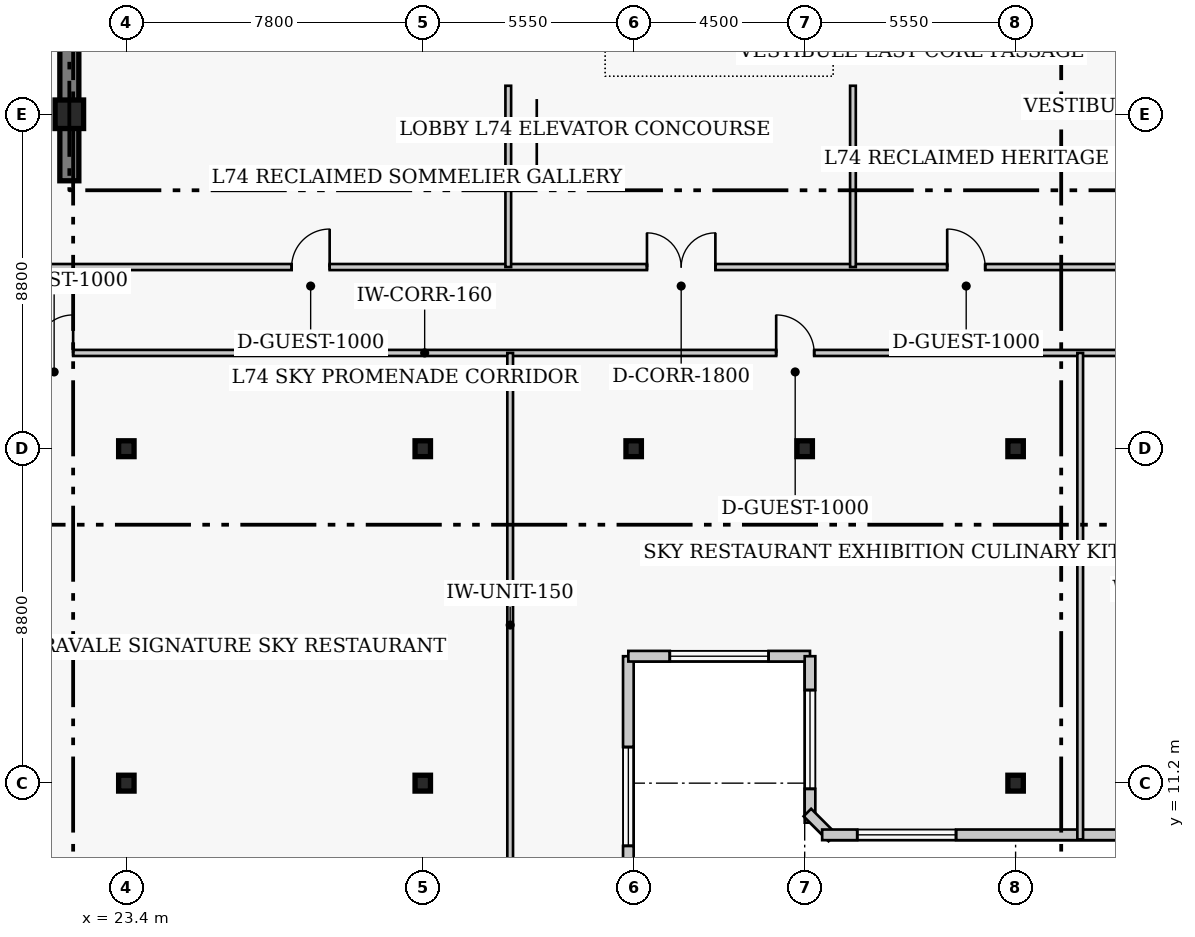
"""IFC4 building model, lengths in metres.
Left out: names, types, materials, properties, quantities, classifications, styles, units other than length and angle.
Written with IfcOpenShell. Run it as: python <this file> out.ifc"""

import sys

from ifc_helpers import new_model, si_unit, direction, frame, frame_2d, origin, origin_2d, place, context, subcontext, project, spatial, rectangle, i_section, extrude, element, fill, save


model = new_model("IFC4")
c1 = context("Model", 3, precision=1e-05, world=origin(), true_north=direction((0.0, 1.0)))
c2 = subcontext(c1, "Body", "Model", "MODEL_VIEW")
j1 = project(units=[si_unit("LENGTHUNIT", "METRE"), si_unit("PLANEANGLEUNIT", "RADIAN")], contexts=[c1])
p1 = place(None, origin())
s1 = spatial("IfcSite", under=j1, at=p1, CompositionType="ELEMENT")
p2 = place(p1, origin())
s2 = spatial("IfcBuilding", under=s1, at=p2, CompositionType="ELEMENT")
p3 = place(p2, frame((0.0, 0.0, 297.4)))
s3 = spatial("IfcBuildingStorey", under=s2, at=p3, CompositionType="ELEMENT", Elevation=297.4)
p4 = place(p3, frame((21.9, 27.05, 0.0), z_axis=(0.0, 0.0, 1.0), x_axis=(0.0, 1.0, 0.0)))
e1 = element("IfcWall", 1, at=p4, inside=s3, PredefinedType="SHEAR", context=c2, shape_type="SweptSolid", body=[
    extrude(rectangle(XDim=13.52, YDim=0.5, at=frame_2d((6.76, 0.0))), origin(), (0.0, 0.0, 1.0), 4.6),
])
for number, where, z_axis, x_axis in (
    (2, (23.4, 11.2, 0.0), (0.0, 0.0, 1.0), (1.0, 0.0, 0.0)),
    (3, (23.4, 20.0, 0.0), (0.0, 0.0, 1.0), (1.0, 0.0, 0.0)),
    (4, (31.2, 11.2, 0.0), (0.0, 0.0, 1.0), (1.0, 0.0, 0.0)),
    (5, (31.2, 20.0, 0.0), (0.0, 0.0, 1.0), (1.0, 0.0, 0.0)),
    (6, (36.75, 20.0, 0.0), (0.0, 0.0, 1.0), (1.0, 0.0, 0.0)),
    (7, (41.25, 20.0, 0.0), (0.0, 0.0, 1.0), (1.0, 0.0, 0.0)),
    (8, (46.8, 11.2, 0.0), (0.0, 0.0, 1.0), (1.0, 0.0, 0.0)),
    (9, (46.8, 20.0, 0.0), (0.0, 0.0, 1.0), (1.0, 0.0, 0.0)),
):
    element("IfcColumn", number, at=place(p3, frame(where, z_axis=z_axis, x_axis=x_axis)), inside=s3, PredefinedType="COLUMN", context=c2, shape_type="SweptSolid", body=[
        extrude(i_section(OverallWidth=0.406, OverallDepth=0.417, WebThickness=0.03, FlangeThickness=0.048, FilletRadius=0.017, at=origin_2d()), origin(), (0.0, 0.0, 1.0), 4.6),
    ])
p5 = place(p3, frame((21.9, 28.8, 0.0), z_axis=(0.0, 0.0, 1.0), x_axis=(1.0, 0.0, 0.0)))
e10 = element("IfcColumn", 10, at=p5, inside=s3, PredefinedType="COLUMN", context=c2, shape_type="SweptSolid", body=[
    extrude(rectangle(XDim=0.75, YDim=0.75, at=origin_2d()), origin(), (0.0, 0.0, 1.0), 4.6),
])
p6 = place(p3, frame((36.61, 7.16, 0.0), z_axis=(0.0, 0.0, 1.0), x_axis=(0.0, 1.0, 0.0)))
e11 = element("IfcWall", 11, at=p6, inside=s3, PredefinedType="SOLIDWALL", context=c2, shape_type="SweptSolid", body=[
    extrude(rectangle(XDim=7.38, YDim=0.28, at=frame_2d((3.69, 0.0))), origin(), (0.0, 0.0, 1.0), 4.31),
])
p7 = place(p6, frame((2.39, 0.0, 0.65)))
e12 = element("IfcOpeningElement", 12, at=p7, cuts=e11, PredefinedType="OPENING", context=c2, shape_type="SweptSolid", body=[
    extrude(rectangle(XDim=2.6, YDim=2.2, at=frame_2d((1.3, 1.1))), frame((0.0, 0.15, 0.0), z_axis=(0.0, -1.0, 0.0), x_axis=(1.0, 0.0, 0.0)), (0.0, 0.0, 1.0), 0.3),
])
p8 = place(p3, frame((36.61, 14.54, 0.0), z_axis=(0.0, 0.0, 1.0), x_axis=(1.0, 0.0, 0.0)))
e13 = element("IfcWall", 13, at=p8, inside=s3, PredefinedType="SOLIDWALL", context=c2, shape_type="SweptSolid", body=[
    extrude(rectangle(XDim=4.78, YDim=0.28, at=frame_2d((2.39, 0.0))), origin(), (0.0, 0.0, 1.0), 4.31),
])
p9 = place(p8, frame((1.09, 0.0, 0.65)))
e14 = element("IfcOpeningElement", 14, at=p9, cuts=e13, PredefinedType="OPENING", context=c2, shape_type="SweptSolid", body=[
    extrude(rectangle(XDim=2.6, YDim=2.2, at=frame_2d((1.3, 1.1))), frame((0.0, 0.15, 0.0), z_axis=(0.0, -1.0, 0.0), x_axis=(1.0, 0.0, 0.0)), (0.0, 0.0, 1.0), 0.3),
])
p10 = place(p3, frame((41.39, 14.54, 0.0), z_axis=(0.0, 0.0, 1.0), x_axis=(0.0, -1.0, 0.0)))
e15 = element("IfcWall", 15, at=p10, inside=s3, PredefinedType="SOLIDWALL", context=c2, shape_type="SweptSolid", body=[
    extrude(rectangle(XDim=4.38, YDim=0.28, at=frame_2d((2.19, 0.0))), origin(), (0.0, 0.0, 1.0), 4.31),
])
p11 = place(p10, frame((0.89, 0.0, 0.65)))
e16 = element("IfcOpeningElement", 16, at=p11, cuts=e15, PredefinedType="OPENING", context=c2, shape_type="SweptSolid", body=[
    extrude(rectangle(XDim=2.6, YDim=2.2, at=frame_2d((1.3, 1.1))), frame((0.0, 0.15, 0.0), z_axis=(0.0, -1.0, 0.0), x_axis=(1.0, 0.0, 0.0)), (0.0, 0.0, 1.0), 0.3),
])
p12 = place(p3, frame((41.321, 10.427, 0.0), z_axis=(0.0, 0.0, 1.0), x_axis=(0.707106781187, -0.707106781187, 0.0)))
e17 = element("IfcWall", 17, at=p12, inside=s3, PredefinedType="SOLIDWALL", context=c2, shape_type="SweptSolid", body=[
    extrude(rectangle(XDim=0.928, YDim=0.28, at=frame_2d((0.464, 0.0))), origin(), (0.0, 0.0, 1.0), 4.31),
])
p13 = place(p3, frame((41.71, 9.84, 0.0), z_axis=(0.0, 0.0, 1.0), x_axis=(1.0, 0.0, 0.0)))
e18 = element("IfcWall", 18, at=p13, inside=s3, PredefinedType="SOLIDWALL", context=c2, shape_type="SweptSolid", body=[
    extrude(rectangle(XDim=22.23, YDim=0.28, at=frame_2d((11.115, 0.0))), origin(), (0.0, 0.0, 1.0), 4.31),
])
p14 = place(p13, frame((0.923, 0.0, 0.65)))
e19 = element("IfcOpeningElement", 19, at=p14, cuts=e18, PredefinedType="OPENING", context=c2, shape_type="SweptSolid", body=[
    extrude(rectangle(XDim=2.6, YDim=2.2, at=frame_2d((1.3, 1.1))), frame((0.0, 0.15, 0.0), z_axis=(0.0, -1.0, 0.0), x_axis=(1.0, 0.0, 0.0)), (0.0, 0.0, 1.0), 0.3),
])
p15 = place(p13, frame((9.165, 0.0, 0.65)))
e20 = element("IfcOpeningElement", 20, at=p15, cuts=e18, PredefinedType="OPENING", context=c2, shape_type="SweptSolid", body=[
    extrude(rectangle(XDim=2.6, YDim=2.2, at=frame_2d((1.3, 1.1))), frame((0.0, 0.15, 0.0), z_axis=(0.0, -1.0, 0.0), x_axis=(1.0, 0.0, 0.0)), (0.0, 0.0, 1.0), 0.3),
])
p16 = place(p13, frame((14.261, 0.0, 0.65)))
e21 = element("IfcOpeningElement", 21, at=p16, cuts=e18, PredefinedType="OPENING", context=c2, shape_type="SweptSolid", body=[
    extrude(rectangle(XDim=2.6, YDim=2.2, at=frame_2d((1.3, 1.1))), frame((0.0, 0.15, 0.0), z_axis=(0.0, -1.0, 0.0), x_axis=(1.0, 0.0, 0.0)), (0.0, 0.0, 1.0), 0.3),
])
p17 = place(p3, frame((9.3, 22.52, 0.0), z_axis=(0.0, 0.0, 1.0), x_axis=(1.0, 0.0, 0.0)))
e22 = element("IfcWall", 22, at=p17, inside=s3, PredefinedType="PARTITIONING", context=c2, shape_type="SweptSolid", body=[
    extrude(rectangle(XDim=59.4, YDim=0.16, at=frame_2d((29.7, 0.0))), origin(), (0.0, 0.0, 1.0), 4.31),
])
p18 = place(p17, frame((11.7, 0.0, 0.0)))
e23 = element("IfcOpeningElement", 23, at=p18, cuts=e22, PredefinedType="OPENING", context=c2, shape_type="SweptSolid", body=[
    extrude(rectangle(XDim=1.0, YDim=2.15, at=frame_2d((0.5, 1.075))), frame((0.0, 0.09, 0.0), z_axis=(0.0, -1.0, 0.0), x_axis=(1.0, 0.0, 0.0)), (0.0, 0.0, 1.0), 0.18),
])
p19 = place(p17, frame((31.2, 0.0, 0.0)))
e24 = element("IfcOpeningElement", 24, at=p19, cuts=e22, PredefinedType="OPENING", context=c2, shape_type="SweptSolid", body=[
    extrude(rectangle(XDim=1.0, YDim=2.15, at=frame_2d((0.5, 1.075))), frame((0.0, 0.09, 0.0), z_axis=(0.0, -1.0, 0.0), x_axis=(1.0, 0.0, 0.0)), (0.0, 0.0, 1.0), 0.18),
])
p20 = place(p17, frame((48.7, 0.0, 0.0)))
e25 = element("IfcOpeningElement", 25, at=p20, cuts=e22, PredefinedType="OPENING", context=c2, shape_type="SweptSolid", body=[
    extrude(rectangle(XDim=1.0, YDim=2.15, at=frame_2d((0.5, 1.075))), frame((0.0, 0.09, 0.0), z_axis=(0.0, -1.0, 0.0), x_axis=(1.0, 0.0, 0.0)), (0.0, 0.0, 1.0), 0.18),
])
p21 = place(p3, frame((9.3, 24.78, 0.0), z_axis=(0.0, 0.0, 1.0), x_axis=(1.0, 0.0, 0.0)))
e26 = element("IfcWall", 26, at=p21, inside=s3, PredefinedType="PARTITIONING", context=c2, shape_type="SweptSolid", body=[
    extrude(rectangle(XDim=59.4, YDim=0.16, at=frame_2d((29.7, 0.0))), origin(), (0.0, 0.0, 1.0), 4.31),
])
p22 = place(p21, frame((27.8, 0.0, 0.0)))
e27 = element("IfcOpeningElement", 27, at=p22, cuts=e26, PredefinedType="OPENING", context=c2, shape_type="SweptSolid", body=[
    extrude(rectangle(XDim=1.8, YDim=2.2, at=frame_2d((0.9, 1.1))), frame((0.0, 0.09, 0.0), z_axis=(0.0, -1.0, 0.0), x_axis=(1.0, 0.0, 0.0)), (0.0, 0.0, 1.0), 0.18),
])
p23 = place(p21, frame((18.45, 0.0, 0.0)))
e28 = element("IfcOpeningElement", 28, at=p23, cuts=e26, PredefinedType="OPENING", context=c2, shape_type="SweptSolid", body=[
    extrude(rectangle(XDim=1.0, YDim=2.15, at=frame_2d((0.5, 1.075))), frame((0.0, 0.09, 0.0), z_axis=(0.0, -1.0, 0.0), x_axis=(1.0, 0.0, 0.0)), (0.0, 0.0, 1.0), 0.18),
])
p24 = place(p21, frame((35.7, 0.0, 0.0)))
e29 = element("IfcOpeningElement", 29, at=p24, cuts=e26, PredefinedType="OPENING", context=c2, shape_type="SweptSolid", body=[
    extrude(rectangle(XDim=1.0, YDim=2.15, at=frame_2d((0.5, 1.075))), frame((0.0, 0.09, 0.0), z_axis=(0.0, -1.0, 0.0), x_axis=(1.0, 0.0, 0.0)), (0.0, 0.0, 1.0), 0.18),
])
p25 = place(p21, frame((5.75, 0.0, 0.0)))
e30 = element("IfcOpeningElement", 30, at=p25, cuts=e26, PredefinedType="OPENING", context=c2, shape_type="SweptSolid", body=[
    extrude(rectangle(XDim=1.0, YDim=2.15, at=frame_2d((0.5, 1.075))), frame((0.0, 0.09, 0.0), z_axis=(0.0, -1.0, 0.0), x_axis=(1.0, 0.0, 0.0)), (0.0, 0.0, 1.0), 0.18),
])
p26 = place(p21, frame((49.31, 0.0, 0.0)))
e31 = element("IfcOpeningElement", 31, at=p26, cuts=e26, PredefinedType="OPENING", context=c2, shape_type="SweptSolid", body=[
    extrude(rectangle(XDim=0.88, YDim=2.05, at=frame_2d((0.44, 1.025))), frame((0.0, 0.09, 0.0), z_axis=(0.0, -1.0, 0.0), x_axis=(1.0, 0.0, 0.0)), (0.0, 0.0, 1.0), 0.18),
])
p27 = place(p21, frame((51.55, 0.0, 0.0)))
e32 = element("IfcOpeningElement", 32, at=p27, cuts=e26, PredefinedType="OPENING", context=c2, shape_type="SweptSolid", body=[
    extrude(rectangle(XDim=1.0, YDim=2.15, at=frame_2d((0.5, 1.075))), frame((0.0, 0.09, 0.0), z_axis=(0.0, -1.0, 0.0), x_axis=(1.0, 0.0, 0.0)), (0.0, 0.0, 1.0), 0.18),
])
for number, where, z_axis, x_axis in (
    (33, (33.45, 24.78, 0.0), (0.0, 0.0, 1.0), (0.0, 1.0, 0.0)),
    (34, (42.52, 24.78, 0.0), (0.0, 0.0, 1.0), (0.0, 1.0, 0.0)),
):
    element("IfcWall", number, at=place(p3, frame(where, z_axis=z_axis, x_axis=x_axis)), inside=s3, PredefinedType="PARTITIONING", context=c2, shape_type="SweptSolid", body=[
        extrude(rectangle(XDim=4.77, YDim=0.15, at=frame_2d((2.385, 0.0))), origin(), (0.0, 0.0, 1.0), 4.31),
    ])
p28 = place(p3, frame((33.5, 8.2, 0.0), z_axis=(0.0, 0.0, 1.0), x_axis=(0.0, 1.0, 0.0)))
e35 = element("IfcWall", 35, at=p28, inside=s3, PredefinedType="PARTITIONING", context=c2, shape_type="SweptSolid", body=[
    extrude(rectangle(XDim=14.32, YDim=0.15, at=frame_2d((7.16, 0.0))), origin(), (0.0, 0.0, 1.0), 4.31),
])
p29 = place(p3, frame((48.5, 9.72, 0.0), z_axis=(0.0, 0.0, 1.0), x_axis=(0.0, 1.0, 0.0)))
e36 = element("IfcWall", 36, at=p29, inside=s3, PredefinedType="PARTITIONING", context=c2, shape_type="SweptSolid", body=[
    extrude(rectangle(XDim=12.8, YDim=0.15, at=frame_2d((6.4, 0.0))), origin(), (0.0, 0.0, 1.0), 3.906),
])
p30 = place(p7, origin())
e37 = element("IfcWindow", 37, at=p30, inside=s3, PartitioningType="SINGLE_PANEL", PredefinedType="WINDOW", context=c2, shape_type="SweptSolid", body=[
    extrude(rectangle(XDim=2.6, YDim=2.2, at=frame_2d((1.3, 1.1))), frame((0.0, 0.03, 0.0), z_axis=(0.0, -1.0, 0.0), x_axis=(1.0, 0.0, 0.0)), (0.0, 0.0, 1.0), 0.06),
])
fill(e12, e37)
p31 = place(p9, origin())
e38 = element("IfcWindow", 38, at=p31, inside=s3, PartitioningType="SINGLE_PANEL", PredefinedType="WINDOW", context=c2, shape_type="SweptSolid", body=[
    extrude(rectangle(XDim=2.6, YDim=2.2, at=frame_2d((1.3, 1.1))), frame((0.0, 0.03, 0.0), z_axis=(0.0, -1.0, 0.0), x_axis=(1.0, 0.0, 0.0)), (0.0, 0.0, 1.0), 0.06),
])
fill(e14, e38)
p32 = place(p11, origin())
e39 = element("IfcWindow", 39, at=p32, inside=s3, PartitioningType="SINGLE_PANEL", PredefinedType="WINDOW", context=c2, shape_type="SweptSolid", body=[
    extrude(rectangle(XDim=2.6, YDim=2.2, at=frame_2d((1.3, 1.1))), frame((0.0, 0.03, 0.0), z_axis=(0.0, -1.0, 0.0), x_axis=(1.0, 0.0, 0.0)), (0.0, 0.0, 1.0), 0.06),
])
fill(e16, e39)
p33 = place(p14, origin())
e40 = element("IfcWindow", 40, at=p33, inside=s3, PartitioningType="SINGLE_PANEL", PredefinedType="WINDOW", context=c2, shape_type="SweptSolid", body=[
    extrude(rectangle(XDim=2.6, YDim=2.2, at=frame_2d((1.3, 1.1))), frame((0.0, 0.03, 0.0), z_axis=(0.0, -1.0, 0.0), x_axis=(1.0, 0.0, 0.0)), (0.0, 0.0, 1.0), 0.06),
])
fill(e19, e40)
p34 = place(p22, origin())
e41 = element("IfcDoor", 41, at=p34, inside=s3, OperationType="DOUBLE_DOOR_SINGLE_SWING", PredefinedType="DOOR", context=c2, shape_type="SweptSolid", body=[
    extrude(rectangle(XDim=1.8, YDim=2.2, at=frame_2d((0.9, 1.1))), frame((0.0, 0.025, 0.0), z_axis=(0.0, -1.0, 0.0), x_axis=(1.0, 0.0, 0.0)), (0.0, 0.0, 1.0), 0.05),
])
fill(e27, e41)
p35 = place(p23, origin())
e42 = element("IfcDoor", 42, at=p35, inside=s3, OperationType="SINGLE_SWING_RIGHT", PredefinedType="DOOR", context=c2, shape_type="SweptSolid", body=[
    extrude(rectangle(XDim=1.0, YDim=2.15, at=frame_2d((0.5, 1.075))), frame((0.0, 0.025, 0.0), z_axis=(0.0, -1.0, 0.0), x_axis=(1.0, 0.0, 0.0)), (0.0, 0.0, 1.0), 0.05),
])
fill(e28, e42)
p36 = place(p24, origin())
e43 = element("IfcDoor", 43, at=p36, inside=s3, OperationType="SINGLE_SWING_LEFT", PredefinedType="DOOR", context=c2, shape_type="SweptSolid", body=[
    extrude(rectangle(XDim=1.0, YDim=2.15, at=frame_2d((0.5, 1.075))), frame((0.0, 0.025, 0.0), z_axis=(0.0, -1.0, 0.0), x_axis=(1.0, 0.0, 0.0)), (0.0, 0.0, 1.0), 0.05),
])
fill(e29, e43)
p37 = place(p18, origin())
e44 = element("IfcDoor", 44, at=p37, inside=s3, OperationType="SINGLE_SWING_RIGHT", PredefinedType="DOOR", context=c2, shape_type="SweptSolid", body=[
    extrude(rectangle(XDim=1.0, YDim=2.15, at=frame_2d((0.5, 1.075))), frame((0.0, 0.025, 0.0), z_axis=(0.0, -1.0, 0.0), x_axis=(1.0, 0.0, 0.0)), (0.0, 0.0, 1.0), 0.05),
])
fill(e23, e44)
p38 = place(p19, origin())
e45 = element("IfcDoor", 45, at=p38, inside=s3, OperationType="SINGLE_SWING_LEFT", PredefinedType="DOOR", context=c2, shape_type="SweptSolid", body=[
    extrude(rectangle(XDim=1.0, YDim=2.15, at=frame_2d((0.5, 1.075))), frame((0.0, 0.025, 0.0), z_axis=(0.0, -1.0, 0.0), x_axis=(1.0, 0.0, 0.0)), (0.0, 0.0, 1.0), 0.05),
])
fill(e24, e45)
save(model, sys.argv[1])
